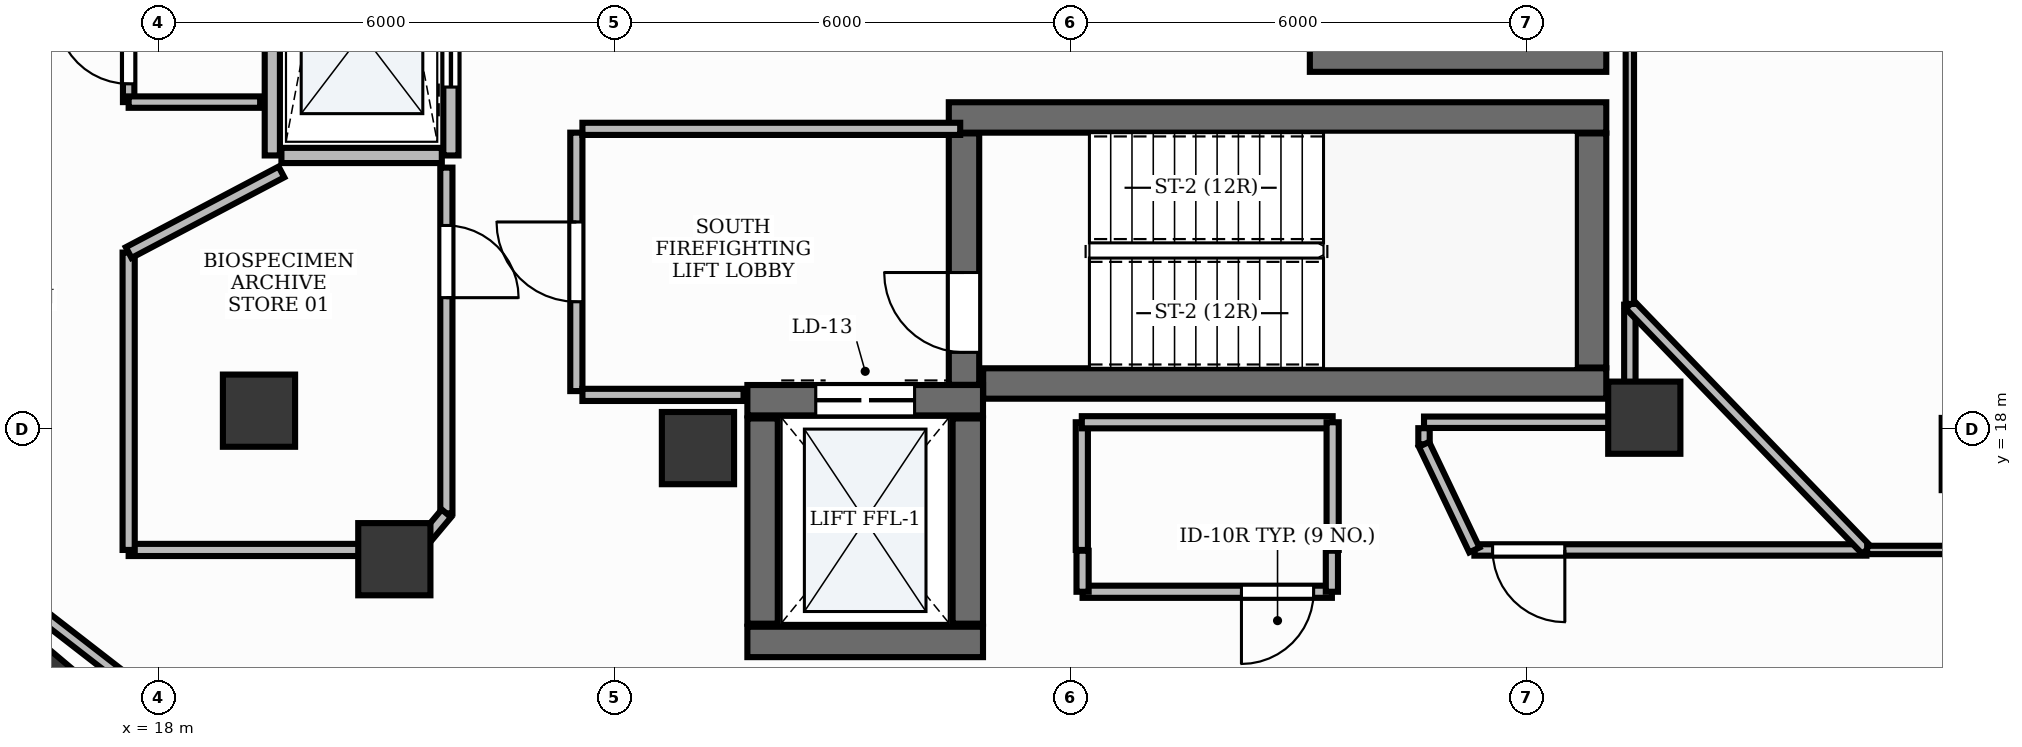
"""IFC4 building model, lengths in metres.
Left out: names, types, materials, properties, quantities, classifications, styles, units other than length and angle.
Written with IfcOpenShell. Run it as: python <this file> out.ifc"""

import sys

from ifc_helpers import new_model, si_unit, direction, frame, frame_2d, origin, origin_2d, place, context, subcontext, project, spatial, rectangle, extrude, element, fill, save


model = new_model("IFC4")
c1 = context("Model", 3, precision=1e-05, world=origin(), true_north=direction((0.0, 1.0)))
c2 = subcontext(c1, "Body", "Model", "MODEL_VIEW")
j1 = project(units=[si_unit("LENGTHUNIT", "METRE"), si_unit("PLANEANGLEUNIT", "RADIAN")], contexts=[c1])
p1 = place(None, origin())
s1 = spatial("IfcSite", under=j1, at=p1, CompositionType="ELEMENT")
p2 = place(p1, origin())
s2 = spatial("IfcBuilding", under=s1, at=p2, CompositionType="ELEMENT")
p3 = place(p2, frame((0.0, 0.0, 204.6)))
s3 = spatial("IfcBuildingStorey", under=s2, at=p3, CompositionType="ELEMENT", Elevation=204.6)
p4 = place(p3, frame((28.852, 18.6, 0.0), z_axis=(0.0, 0.0, 1.0), x_axis=(1.0, 0.0, 0.0)))
e1 = element("IfcWall", 1, at=p4, inside=s3, PredefinedType="SHEAR", context=c2, shape_type="SweptSolid", body=[
    extrude(rectangle(XDim=8.198, YDim=0.4, at=frame_2d((4.099, 0.0))), origin(), (0.0, 0.0, 1.0), 3.9),
])
p5 = place(p3, frame((28.4, 22.1, 0.0), z_axis=(0.0, 0.0, 1.0), x_axis=(1.0, 0.0, 0.0)))
e2 = element("IfcWall", 2, at=p5, inside=s3, PredefinedType="SHEAR", context=c2, shape_type="SweptSolid", body=[
    extrude(rectangle(XDim=8.65, YDim=0.4, at=frame_2d((4.325, 0.0))), origin(), (0.0, 0.0, 1.0), 3.9),
])
p6 = place(p3, frame((36.85, 18.81, 0.0), z_axis=(0.0, 0.0, 1.0), x_axis=(0.0, 1.0, 0.0)))
e3 = element("IfcWall", 3, at=p6, inside=s3, PredefinedType="SHEAR", context=c2, shape_type="SweptSolid", body=[
    extrude(rectangle(XDim=3.08, YDim=0.4, at=frame_2d((1.54, 0.0))), origin(), (0.0, 0.0, 1.0), 3.9),
])
p7 = place(p3, frame((28.6, 18.582, 0.0), z_axis=(0.0, 0.0, 1.0), x_axis=(0.0, 1.0, 0.0)))
e4 = element("IfcWall", 4, at=p7, inside=s3, PredefinedType="SHEAR", context=c2, shape_type="SweptSolid", body=[
    extrude(rectangle(XDim=3.308, YDim=0.4, at=frame_2d((1.654, 0.0))), origin(), (0.0, 0.0, 1.0), 3.9),
])
p8 = place(p7, frame((0.428, 0.0, 0.0)))
e5 = element("IfcOpeningElement", 5, at=p8, cuts=e4, PredefinedType="OPENING", context=c2, shape_type="SweptSolid", body=[
    extrude(rectangle(XDim=1.05, YDim=2.15, at=frame_2d((0.525, 1.075))), frame((0.0, 0.215, 0.0), z_axis=(0.0, -1.0, 0.0), x_axis=(1.0, 0.0, 0.0)), (0.0, 0.0, 1.0), 0.43),
])
p9 = place(p3, frame((33.15, 22.9, 0.0), z_axis=(0.0, 0.0, 1.0), x_axis=(1.0, 0.0, 0.0)))
e6 = element("IfcWall", 6, at=p9, inside=s3, PredefinedType="SHEAR", context=c2, shape_type="SweptSolid", body=[
    extrude(rectangle(XDim=3.9, YDim=0.4, at=frame_2d((1.95, 0.0))), origin(), (0.0, 0.0, 1.0), 3.9),
])
p10 = place(p3, frame((25.75, 15.2, 0.0), z_axis=(0.0, 0.0, 1.0), x_axis=(1.0, 0.0, 0.0)))
e7 = element("IfcWall", 7, at=p10, inside=s3, PredefinedType="SHEAR", context=c2, shape_type="SweptSolid", body=[
    extrude(rectangle(XDim=3.1, YDim=0.4, at=frame_2d((1.55, 0.0))), origin(), (0.0, 0.0, 1.0), 3.9),
])
p11 = place(p3, frame((25.75, 18.38, 0.0), z_axis=(0.0, 0.0, 1.0), x_axis=(1.0, 0.0, 0.0)))
e8 = element("IfcWall", 8, at=p11, inside=s3, PredefinedType="SHEAR", context=c2, shape_type="SweptSolid", body=[
    extrude(rectangle(XDim=3.1, YDim=0.4, at=frame_2d((1.55, 0.0))), origin(), (0.0, 0.0, 1.0), 3.9),
])
p12 = place(p11, frame((0.9, 0.0, 0.0)))
e9 = element("IfcOpeningElement", 9, at=p12, cuts=e8, PredefinedType="OPENING", context=c2, shape_type="SweptSolid", body=[
    extrude(rectangle(XDim=1.3, YDim=2.2, at=frame_2d((0.65, 1.1))), frame((0.0, 0.215, 0.0), z_axis=(0.0, -1.0, 0.0), x_axis=(1.0, 0.0, 0.0)), (0.0, 0.0, 1.0), 0.43),
])
for number, where, z_axis, x_axis in (
    (10, (25.95, 15.44, 0.0), (0.0, 0.0, 1.0), (0.0, 1.0, 0.0)),
    (11, (28.65, 15.44, 0.0), (0.0, 0.0, 1.0), (0.0, 1.0, 0.0)),
):
    element("IfcWall", number, at=place(p3, frame(where, z_axis=z_axis, x_axis=x_axis)), inside=s3, PredefinedType="SHEAR", context=c2, shape_type="SweptSolid", body=[
        extrude(rectangle(XDim=2.7, YDim=0.4, at=frame_2d((1.35, 0.0))), origin(), (0.0, 0.0, 1.0), 3.9),
    ])
for number, where, z_axis, x_axis in (
    (12, (25.1, 17.75, -0.0), (0.0, 0.0, 1.0), (1.0, 0.0, 0.0)),
    (13, (37.55, 18.15, -0.0), (0.0, 0.0, 1.0), (1.0, 0.0, 0.0)),
):
    element("IfcColumn", number, at=place(p3, frame(where, z_axis=z_axis, x_axis=x_axis)), inside=s3, PredefinedType="PILASTER", context=c2, shape_type="SweptSolid", body=[
        extrude(rectangle(XDim=0.95, YDim=0.95, at=origin_2d()), origin(), (0.0, 0.0, 1.0), 3.901),
    ])
p13 = place(p3, frame((19.325, 18.242, -0.0), z_axis=(0.0, 0.0, 1.0), x_axis=(1.0, 0.0, 0.0)))
e14 = element("IfcColumn", 14, at=p13, inside=s3, PredefinedType="COLUMN", context=c2, shape_type="SweptSolid", body=[
    extrude(rectangle(XDim=0.95, YDim=0.95, at=origin_2d()), origin(), (0.0, 0.0, 1.0), 3.901),
])
p14 = place(p3, frame((16.416, 14.573, -0.0), z_axis=(0.0, 0.0, 1.0), x_axis=(-0.764246456939, 0.644924300253, 0.0)))
e15 = element("IfcColumn", 15, at=p14, inside=s3, PredefinedType="COLUMN", context=c2, shape_type="SweptSolid", body=[
    extrude(rectangle(XDim=1.0, YDim=1.0, at=origin_2d()), origin(), (0.0, 0.0, 1.0), 3.901),
])
for number, where, z_axis, x_axis in (
    (16, (21.105, 16.288, -0.0), (0.0, 0.0, 1.0), (1.0, 0.0, 0.0)),
    (17, (41.938, 17.672, -0.0), (0.0, 0.0, 1.0), (1.0, 0.0, 0.0)),
):
    element("IfcColumn", number, at=place(p3, frame(where, z_axis=z_axis, x_axis=x_axis)), inside=s3, PredefinedType="COLUMN", context=c2, shape_type="SweptSolid", body=[
        extrude(rectangle(XDim=0.95, YDim=0.95, at=origin_2d()), origin(), (0.0, 0.0, 1.0), 3.901),
    ])
p15 = place(p3, frame((19.5, 21.6, 0.0), z_axis=(0.0, 0.0, 1.0), x_axis=(0.0, 1.0, 0.0)))
e18 = element("IfcWall", 18, at=p15, inside=s3, PredefinedType="PARTITIONING", context=c2, shape_type="SweptSolid", body=[
    extrude(rectangle(XDim=10.8, YDim=0.2, at=frame_2d((5.4, 0.0))), origin(), (0.0, 0.0, 1.0), 2.91),
])
p16 = place(p3, frame((21.85, 21.6, 0.0), z_axis=(0.0, 0.0, 1.0), x_axis=(0.0, 1.0, 0.0)))
e19 = element("IfcWall", 19, at=p16, inside=s3, PredefinedType="PARTITIONING", context=c2, shape_type="SweptSolid", body=[
    extrude(rectangle(XDim=10.8, YDim=0.2, at=frame_2d((5.4, 0.0))), origin(), (0.0, 0.0, 1.0), 2.91),
])
p17 = place(p16, frame((0.9, 0.0, 0.0)))
e20 = element("IfcOpeningElement", 20, at=p17, cuts=e19, PredefinedType="OPENING", context=c2, shape_type="SweptSolid", body=[
    extrude(rectangle(XDim=1.1, YDim=2.2, at=frame_2d((0.55, 1.1))), frame((0.0, 0.115, 0.0), z_axis=(0.0, -1.0, 0.0), x_axis=(1.0, 0.0, 0.0)), (0.0, 0.0, 1.0), 0.23),
])
p18 = place(p16, frame((3.6, 0.0, 0.0)))
e21 = element("IfcOpeningElement", 21, at=p18, cuts=e19, PredefinedType="OPENING", context=c2, shape_type="SweptSolid", body=[
    extrude(rectangle(XDim=1.1, YDim=2.2, at=frame_2d((0.55, 1.1))), frame((0.0, 0.115, 0.0), z_axis=(0.0, -1.0, 0.0), x_axis=(1.0, 0.0, 0.0)), (0.0, 0.0, 1.0), 0.23),
])
p19 = place(p16, frame((6.3, 0.0, 0.0)))
e22 = element("IfcOpeningElement", 22, at=p19, cuts=e19, PredefinedType="OPENING", context=c2, shape_type="SweptSolid", body=[
    extrude(rectangle(XDim=1.1, YDim=2.2, at=frame_2d((0.55, 1.1))), frame((0.0, 0.115, 0.0), z_axis=(0.0, -1.0, 0.0), x_axis=(1.0, 0.0, 0.0)), (0.0, 0.0, 1.0), 0.23),
])
p20 = place(p16, frame((9.0, 0.0, 0.0)))
e23 = element("IfcOpeningElement", 23, at=p20, cuts=e19, PredefinedType="OPENING", context=c2, shape_type="SweptSolid", body=[
    extrude(rectangle(XDim=1.1, YDim=2.2, at=frame_2d((0.55, 1.1))), frame((0.0, 0.115, 0.0), z_axis=(0.0, -1.0, 0.0), x_axis=(1.0, 0.0, 0.0)), (0.0, 0.0, 1.0), 0.23),
])
p21 = place(p3, frame((19.62, 21.6, 0.0), z_axis=(0.0, 0.0, 1.0), x_axis=(1.0, 0.0, 0.0)))
e24 = element("IfcWall", 24, at=p21, inside=s3, PredefinedType="PARTITIONING", context=c2, shape_type="SweptSolid", body=[
    extrude(rectangle(XDim=2.11, YDim=0.2, at=frame_2d((1.055, 0.0))), origin(), (0.0, 0.0, 1.0), 2.91),
])
p22 = place(p3, frame((23.5, 18.5, 0.0), z_axis=(0.0, 0.0, 1.0), x_axis=(0.0, 1.0, 0.0)))
e25 = element("IfcWall", 25, at=p22, inside=s3, PredefinedType="PARTITIONING", context=c2, shape_type="SweptSolid", body=[
    extrude(rectangle(XDim=3.4, YDim=0.16, at=frame_2d((1.7, 0.0))), origin(), (0.0, 0.0, 1.0), 2.91),
])
p23 = place(p22, frame((1.175, 0.0, 0.0)))
e26 = element("IfcOpeningElement", 26, at=p23, cuts=e25, PredefinedType="OPENING", context=c2, shape_type="SweptSolid", body=[
    extrude(rectangle(XDim=1.05, YDim=2.15, at=frame_2d((0.525, 1.075))), frame((0.0, 0.095, 0.0), z_axis=(0.0, -1.0, 0.0), x_axis=(1.0, 0.0, 0.0)), (0.0, 0.0, 1.0), 0.19),
])
p24 = place(p3, frame((23.58, 21.95, 0.0), z_axis=(0.0, 0.0, 1.0), x_axis=(1.0, 0.0, 0.0)))
e27 = element("IfcWall", 27, at=p24, inside=s3, PredefinedType="PARTITIONING", context=c2, shape_type="SweptSolid", body=[
    extrude(rectangle(XDim=4.97, YDim=0.16, at=frame_2d((2.485, 0.0))), origin(), (0.0, 0.0, 1.0), 2.91),
])
p25 = place(p3, frame((23.58, 18.45, 0.0), z_axis=(0.0, 0.0, 1.0), x_axis=(1.0, 0.0, 0.0)))
e28 = element("IfcWall", 28, at=p25, inside=s3, PredefinedType="PARTITIONING", context=c2, shape_type="SweptSolid", body=[
    extrude(rectangle(XDim=2.12, YDim=0.16, at=frame_2d((1.06, 0.0))), origin(), (0.0, 0.0, 1.0), 2.91),
])
p26 = place(p3, frame((33.44, 15.86, 0.0), z_axis=(0.0, 0.0, 1.0), x_axis=(-1.0, 0.0, 0.0)))
e29 = element("IfcWall", 29, at=p26, inside=s3, PredefinedType="PARTITIONING", context=c2, shape_type="SweptSolid", body=[
    extrude(rectangle(XDim=3.28, YDim=0.16, at=frame_2d((1.64, 0.0))), origin(), (0.0, 0.0, 1.0), 2.91),
])
p27 = place(p26, frame((0.24, 0.0, 0.0)))
e30 = element("IfcOpeningElement", 30, at=p27, cuts=e29, PredefinedType="OPENING", context=c2, shape_type="SweptSolid", body=[
    extrude(rectangle(XDim=0.95, YDim=2.15, at=frame_2d((0.475, 1.075))), frame((0.0, 0.095, 0.0), z_axis=(0.0, -1.0, 0.0), x_axis=(1.0, 0.0, 0.0)), (0.0, 0.0, 1.0), 0.19),
])
p28 = place(p3, frame((21.79, 21.44, 0.0), z_axis=(0.0, 0.0, 1.0), x_axis=(0.0, -1.0, 0.0)))
e31 = element("IfcWall", 31, at=p28, inside=s3, PredefinedType="PARTITIONING", context=c2, shape_type="SweptSolid", body=[
    extrude(rectangle(XDim=4.549, YDim=0.16, at=frame_2d((2.274, 0.0))), origin(), (0.0, 0.0, 1.0), 2.91),
])
p29 = place(p28, frame((0.761, 0.0, 0.0)))
e32 = element("IfcOpeningElement", 32, at=p29, cuts=e31, PredefinedType="OPENING", context=c2, shape_type="SweptSolid", body=[
    extrude(rectangle(XDim=0.95, YDim=2.15, at=frame_2d((0.475, 1.075))), frame((0.0, 0.095, 0.0), z_axis=(0.0, -1.0, 0.0), x_axis=(1.0, 0.0, 0.0)), (0.0, 0.0, 1.0), 0.19),
])
p30 = place(p3, frame((40.472, 16.41, 0.0), z_axis=(0.0, 0.0, 1.0), x_axis=(-1.0, 0.0, 0.0)))
e33 = element("IfcWall", 33, at=p30, inside=s3, PredefinedType="PARTITIONING", context=c2, shape_type="SweptSolid", body=[
    extrude(rectangle(XDim=5.157, YDim=0.15, at=frame_2d((2.579, 0.0))), origin(), (0.0, 0.0, 1.0), 2.91),
])
p31 = place(p30, frame((3.968, 0.0, 0.0)))
e34 = element("IfcOpeningElement", 34, at=p31, cuts=e33, PredefinedType="OPENING", context=c2, shape_type="SweptSolid", body=[
    extrude(rectangle(XDim=0.95, YDim=2.15, at=frame_2d((0.475, 1.075))), frame((0.0, 0.09, 0.0), z_axis=(0.0, -1.0, 0.0), x_axis=(1.0, 0.0, 0.0)), (0.0, 0.0, 1.0), 0.18),
])
p32 = place(p3, frame((17.61, 22.302, 0.0), z_axis=(0.0, 0.0, 1.0), x_axis=(0.0, 1.0, 0.0)))
e35 = element("IfcWall", 35, at=p32, inside=s3, PredefinedType="PARTITIONING", context=c2, shape_type="SweptSolid", body=[
    extrude(rectangle(XDim=9.488, YDim=0.15, at=frame_2d((4.744, 0.0))), origin(), (0.0, 0.0, 1.0), 2.91),
])
p33 = place(p32, frame((0.24, 0.0, 0.0)))
e36 = element("IfcOpeningElement", 36, at=p33, cuts=e35, PredefinedType="OPENING", context=c2, shape_type="SweptSolid", body=[
    extrude(rectangle(XDim=0.95, YDim=2.15, at=frame_2d((0.475, 1.075))), frame((0.0, 0.09, 0.0), z_axis=(0.0, -1.0, 0.0), x_axis=(1.0, 0.0, 0.0)), (0.0, 0.0, 1.0), 0.18),
])
for number, where, z_axis, x_axis in (
    (37, (33.44, 16.4, 0.0), (0.0, 0.0, 1.0), (0.0, -1.0, 0.0)),
    (38, (30.16, 15.86, 0.0), (0.0, 0.0, 1.0), (0.0, 1.0, 0.0)),
):
    element("IfcWall", number, at=place(p3, frame(where, z_axis=z_axis, x_axis=x_axis)), inside=s3, PredefinedType="PARTITIONING", context=c2, shape_type="SweptSolid", body=[
        extrude(rectangle(XDim=0.54, YDim=0.16, at=frame_2d((0.27, 0.0))), origin(), (0.0, 0.0, 1.0), 2.91),
    ])
p34 = place(p3, frame((30.15, 16.41, 0.0), z_axis=(0.0, 0.0, 1.0), x_axis=(0.0, 1.0, 0.0)))
e39 = element("IfcWall", 39, at=p34, inside=s3, PredefinedType="PARTITIONING", context=c2, shape_type="SweptSolid", body=[
    extrude(rectangle(XDim=1.68, YDim=0.16, at=frame_2d((0.84, 0.0))), origin(), (0.0, 0.0, 1.0), 2.91),
])
p35 = place(p3, frame((30.15, 18.09, 0.0), z_axis=(0.0, 0.0, 1.0), x_axis=(1.0, 0.0, 0.0)))
e40 = element("IfcWall", 40, at=p35, inside=s3, PredefinedType="PARTITIONING", context=c2, shape_type="SweptSolid", body=[
    extrude(rectangle(XDim=3.3, YDim=0.16, at=frame_2d((1.65, 0.0))), origin(), (0.0, 0.0, 1.0), 2.91),
])
p36 = place(p3, frame((33.45, 18.09, 0.0), z_axis=(0.0, 0.0, 1.0), x_axis=(0.0, -1.0, 0.0)))
e41 = element("IfcWall", 41, at=p36, inside=s3, PredefinedType="PARTITIONING", context=c2, shape_type="SweptSolid", body=[
    extrude(rectangle(XDim=1.68, YDim=0.16, at=frame_2d((0.84, 0.0))), origin(), (0.0, 0.0, 1.0), 2.91),
])
p37 = place(p3, frame((21.79, 16.891, 0.0), z_axis=(0.0, 0.0, 1.0), x_axis=(-0.6421333912, -0.766592921899, 0.0)))
e42 = element("IfcWall", 42, at=p37, inside=s3, PredefinedType="PARTITIONING", context=c2, shape_type="SweptSolid", body=[
    extrude(rectangle(XDim=0.628, YDim=0.16, at=frame_2d((0.314, 0.0))), origin(), (0.0, 0.0, 1.0), 2.91),
])
p38 = place(p3, frame((21.387, 16.41, 0.0), z_axis=(0.0, 0.0, 1.0), x_axis=(-1.0, 0.0, 0.0)))
e43 = element("IfcWall", 43, at=p38, inside=s3, PredefinedType="PARTITIONING", context=c2, shape_type="SweptSolid", body=[
    extrude(rectangle(XDim=3.777, YDim=0.16, at=frame_2d((1.888, 0.0))), origin(), (0.0, 0.0, 1.0), 2.91),
])
p39 = place(p3, frame((17.61, 16.41, 0.0), z_axis=(0.0, 0.0, 1.0), x_axis=(0.0, 1.0, 0.0)))
e44 = element("IfcWall", 44, at=p39, inside=s3, PredefinedType="PARTITIONING", context=c2, shape_type="SweptSolid", body=[
    extrude(rectangle(XDim=3.912, YDim=0.16, at=frame_2d((1.956, 0.0))), origin(), (0.0, 0.0, 1.0), 2.91),
])
p40 = place(p3, frame((17.61, 20.322, 0.0), z_axis=(0.0, 0.0, 1.0), x_axis=(0.884437714556, 0.466658257261, 0.0)))
e45 = element("IfcWall", 45, at=p40, inside=s3, PredefinedType="PARTITIONING", context=c2, shape_type="SweptSolid", body=[
    extrude(rectangle(XDim=2.273, YDim=0.16, at=frame_2d((1.136, 0.0))), origin(), (0.0, 0.0, 1.0), 2.91),
])
p41 = place(p3, frame((16.476, 15.551, 0.0), z_axis=(0.0, 0.0, 1.0), x_axis=(0.790344529681, -0.612662651386, 0.0)))
e46 = element("IfcWall", 46, at=p41, inside=s3, PredefinedType="PARTITIONING", context=c2, shape_type="SweptSolid", body=[
    extrude(rectangle(XDim=2.514, YDim=0.15, at=frame_2d((1.257, 0.0))), origin(), (0.0, 0.0, 1.0), 2.91),
])
p42 = place(p3, frame((34.652, 17.799, 0.0), z_axis=(0.0, 0.0, 1.0), x_axis=(0.0, 1.0, 0.0)))
e47 = element("IfcWall", 47, at=p42, inside=s3, PredefinedType="PARTITIONING", context=c2, shape_type="SweptSolid", body=[
    extrude(rectangle(XDim=0.213, YDim=0.15, at=frame_2d((0.106, 0.0))), origin(), (0.0, 0.0, 1.0), 2.91),
])
p43 = place(p3, frame((34.652, 18.09, 0.0), z_axis=(0.0, 0.0, 1.0), x_axis=(1.0, 0.0, 0.0)))
e48 = element("IfcWall", 48, at=p43, inside=s3, PredefinedType="PARTITIONING", context=c2, shape_type="SweptSolid", body=[
    extrude(rectangle(XDim=2.698, YDim=0.15, at=frame_2d((1.349, 0.0))), origin(), (0.0, 0.0, 1.0), 2.91),
])
p44 = place(p3, frame((37.36, 18.1, 0.0), z_axis=(0.0, 0.0, 1.0), x_axis=(0.0, 1.0, 0.0)))
e49 = element("IfcWall", 49, at=p44, inside=s3, PredefinedType="PARTITIONING", context=c2, shape_type="SweptSolid", body=[
    extrude(rectangle(XDim=1.537, YDim=0.15, at=frame_2d((0.769, 0.0))), origin(), (0.0, 0.0, 1.0), 2.91),
])
p45 = place(p3, frame((37.36, 19.637, 0.0), z_axis=(0.0, 0.0, 1.0), x_axis=(0.694165803971, -0.719815140573, 0.0)))
e50 = element("IfcWall", 50, at=p45, inside=s3, PredefinedType="PARTITIONING", context=c2, shape_type="SweptSolid", body=[
    extrude(rectangle(XDim=4.483, YDim=0.15, at=frame_2d((2.242, 0.0))), origin(), (0.0, 0.0, 1.0), 2.91),
])
p46 = place(p3, frame((35.315, 16.41, 0.0), z_axis=(0.0, 0.0, 1.0), x_axis=(-0.430450657863, 0.902614109764, 0.0)))
e51 = element("IfcWall", 51, at=p46, inside=s3, PredefinedType="PARTITIONING", context=c2, shape_type="SweptSolid", body=[
    extrude(rectangle(XDim=1.539, YDim=0.15, at=frame_2d((0.77, 0.0))), origin(), (0.0, 0.0, 1.0), 2.91),
])
p47 = place(p3, frame((44.5, 16.41, 0.0), z_axis=(0.0, 0.0, 1.0), x_axis=(-1.0, 0.0, 0.0)))
e52 = element("IfcWall", 52, at=p47, inside=s3, PredefinedType="MOVABLE", context=c2, shape_type="SweptSolid", body=[
    extrude(rectangle(XDim=4.018, YDim=0.11, at=frame_2d((2.009, 0.0))), origin(), (0.0, 0.0, 1.0), 2.91),
])
p48 = place(p3, frame((37.36, 19.647, 0.0), z_axis=(0.0, 0.0, 1.0), x_axis=(0.0, 1.0, 0.0)))
e53 = element("IfcWall", 53, at=p48, inside=s3, PredefinedType="MOVABLE", context=c2, shape_type="SweptSolid", body=[
    extrude(rectangle(XDim=8.465, YDim=0.11, at=frame_2d((4.232, 0.0))), origin(), (0.0, 0.0, 1.0), 2.91),
])
p49 = place(p3, frame((19.34, 22.302, 0.0), z_axis=(0.0, 0.0, 1.0), x_axis=(-1.0, 0.0, 0.0)))
e54 = element("IfcWall", 54, at=p49, inside=s3, PredefinedType="PARTITIONING", context=c2, shape_type="SweptSolid", body=[
    extrude(rectangle(XDim=1.73, YDim=0.15, at=frame_2d((0.865, 0.0))), origin(), (0.0, 0.0, 1.0), 2.91),
])
p50 = place(p8, origin())
e55 = element("IfcDoor", 55, at=p50, inside=s3, OperationType="SINGLE_SWING_RIGHT", PredefinedType="DOOR", context=c2, shape_type="SweptSolid", body=[
    extrude(rectangle(XDim=1.05, YDim=2.15, at=frame_2d((0.525, 1.075))), frame((0.0, 0.025, 0.0), z_axis=(0.0, -1.0, 0.0), x_axis=(1.0, 0.0, 0.0)), (0.0, 0.0, 1.0), 0.05),
])
fill(e5, e55)
p51 = place(p17, origin())
e56 = element("IfcDoor", 56, at=p51, inside=s3, OperationType="DOUBLE_DOOR_SLIDING", PredefinedType="DOOR", context=c2, shape_type="SweptSolid", body=[
    extrude(rectangle(XDim=1.1, YDim=2.2, at=frame_2d((0.55, 1.1))), frame((0.0, 0.025, 0.0), z_axis=(0.0, -1.0, 0.0), x_axis=(1.0, 0.0, 0.0)), (0.0, 0.0, 1.0), 0.05),
])
fill(e20, e56)
p52 = place(p12, origin())
e57 = element("IfcDoor", 57, at=p52, inside=s3, OperationType="DOUBLE_DOOR_SLIDING", PredefinedType="DOOR", context=c2, shape_type="SweptSolid", body=[
    extrude(rectangle(XDim=1.3, YDim=2.2, at=frame_2d((0.65, 1.1))), frame((0.0, 0.025, 0.0), z_axis=(0.0, -1.0, 0.0), x_axis=(1.0, 0.0, 0.0)), (0.0, 0.0, 1.0), 0.05),
])
fill(e9, e57)
p53 = place(p23, origin())
e58 = element("IfcDoor", 58, at=p53, inside=s3, OperationType="SINGLE_SWING_RIGHT", PredefinedType="DOOR", context=c2, shape_type="SweptSolid", body=[
    extrude(rectangle(XDim=1.05, YDim=2.15, at=frame_2d((0.525, 1.075))), frame((0.0, 0.025, 0.0), z_axis=(0.0, -1.0, 0.0), x_axis=(1.0, 0.0, 0.0)), (0.0, 0.0, 1.0), 0.05),
])
fill(e26, e58)
p54 = place(p27, origin())
e59 = element("IfcDoor", 59, at=p54, inside=s3, OperationType="SINGLE_SWING_RIGHT", PredefinedType="DOOR", context=c2, shape_type="SweptSolid", body=[
    extrude(rectangle(XDim=0.95, YDim=2.15, at=frame_2d((0.475, 1.075))), frame((0.0, 0.025, 0.0), z_axis=(0.0, -1.0, 0.0), x_axis=(1.0, 0.0, 0.0)), (0.0, 0.0, 1.0), 0.05),
])
fill(e30, e59)
p55 = place(p29, origin())
e60 = element("IfcDoor", 60, at=p55, inside=s3, OperationType="SINGLE_SWING_RIGHT", PredefinedType="DOOR", context=c2, shape_type="SweptSolid", body=[
    extrude(rectangle(XDim=0.95, YDim=2.15, at=frame_2d((0.475, 1.075))), frame((0.0, 0.025, 0.0), z_axis=(0.0, -1.0, 0.0), x_axis=(1.0, 0.0, 0.0)), (0.0, 0.0, 1.0), 0.05),
])
fill(e32, e60)
p56 = place(p31, origin())
e61 = element("IfcDoor", 61, at=p56, inside=s3, OperationType="SINGLE_SWING_LEFT", PredefinedType="DOOR", context=c2, shape_type="SweptSolid", body=[
    extrude(rectangle(XDim=0.95, YDim=2.15, at=frame_2d((0.475, 1.075))), frame((0.0, 0.025, 0.0), z_axis=(0.0, -1.0, 0.0), x_axis=(1.0, 0.0, 0.0)), (0.0, 0.0, 1.0), 0.05),
])
fill(e34, e61)
p57 = place(p33, origin())
e62 = element("IfcDoor", 62, at=p57, inside=s3, OperationType="SINGLE_SWING_RIGHT", PredefinedType="DOOR", context=c2, shape_type="SweptSolid", body=[
    extrude(rectangle(XDim=0.95, YDim=2.15, at=frame_2d((0.475, 1.075))), frame((0.0, 0.025, 0.0), z_axis=(0.0, -1.0, 0.0), x_axis=(1.0, 0.0, 0.0)), (0.0, 0.0, 1.0), 0.05),
])
fill(e36, e62)
save(model, sys.argv[1])
